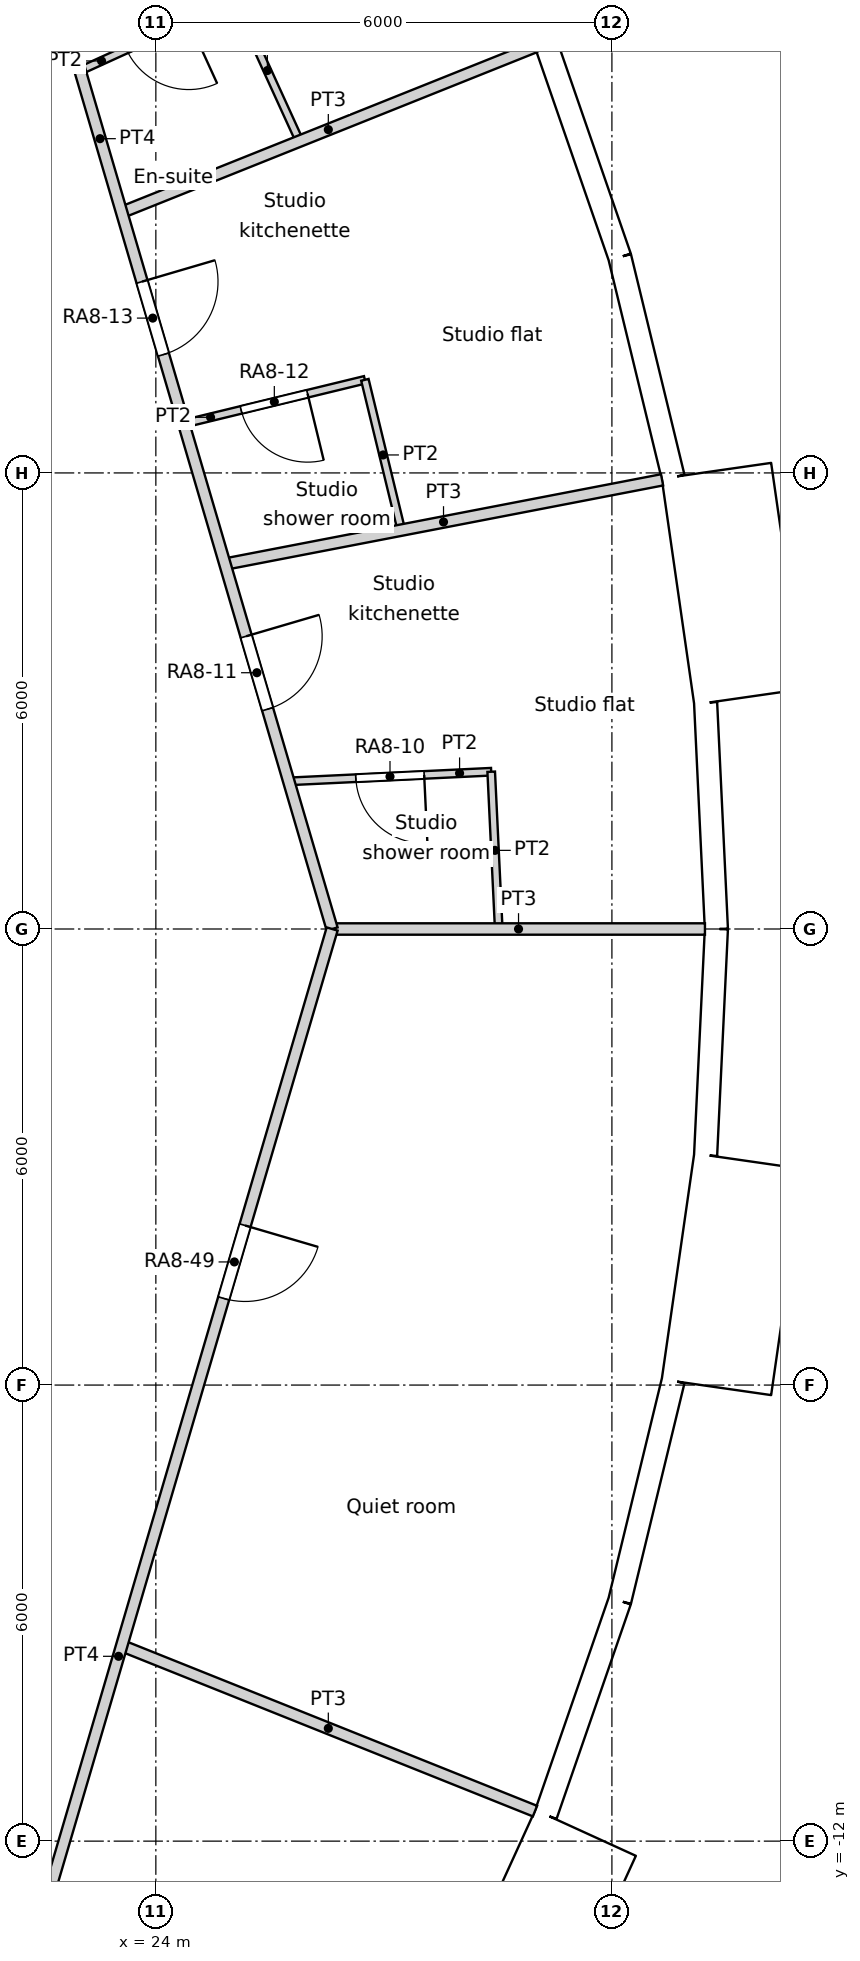
"""IFC4 building model, lengths in metres.
Left out: names, types, materials, properties, quantities, classifications, styles, units other than length and angle.
Written with IfcOpenShell. Run it as: python <this file> out.ifc"""

import sys

from ifc_helpers import new_model, si_unit, direction, frame, frame_2d, origin, origin_2d, place, context, subcontext, project, spatial, rectangle, circle, extrude, element, fill, save


model = new_model("IFC4")
c1 = context("Model", 3, precision=1e-05, world=origin(), true_north=direction((0.0, 1.0)))
c2 = subcontext(c1, "Body", "Model", "MODEL_VIEW")
j1 = project(units=[si_unit("LENGTHUNIT", "METRE"), si_unit("PLANEANGLEUNIT", "RADIAN")], contexts=[c1])
p1 = place(None, origin())
s1 = spatial("IfcSite", under=j1, at=p1, CompositionType="ELEMENT")
p2 = place(p1, origin())
s2 = spatial("IfcBuilding", under=s1, at=p2, CompositionType="ELEMENT")
p3 = place(p2, frame((0.0, 0.0, 103.8)))
s3 = spatial("IfcBuildingStorey", under=s2, at=p3, CompositionType="ELEMENT", Elevation=103.8)
for number, where, z_axis, x_axis in (
    (1, (30.275, 0.0, 0.0), (0.0, 0.0, 1.0), (1.0, 0.0, 0.0)),
    (2, (29.728, 5.729, 0.0), (0.0, 0.0, 1.0), (1.0, 0.0, 0.0)),
    (3, (28.106, 11.252, 0.0), (0.0, 0.0, 1.0), (1.0, 0.0, 0.0)),
    (4, (28.106, -11.252, 0.0), (0.0, 0.0, 1.0), (1.0, 0.0, 0.0)),
    (5, (29.728, -5.729, 0.0), (0.0, 0.0, 1.0), (1.0, 0.0, 0.0)),
):
    element("IfcColumn", number, at=place(p3, frame(where, z_axis=z_axis, x_axis=x_axis)), inside=s3, PredefinedType="COLUMN", context=c2, shape_type="SweptSolid", body=[
        extrude(circle(Radius=0.6, at=origin_2d()), origin(), (0.0, 0.0, 1.0), 3.6),
    ])
for number, where, z_axis, x_axis in (
    (6, (24.548, 0.0, 0.0), (0.0, 0.0, 1.0), (1.0, 0.0, 0.0)),
    (7, (23.886, 5.661, 0.0), (0.0, 0.0, 1.0), (1.0, 0.0, 0.0)),
    (8, (23.886, -5.661, 0.0), (0.0, 0.0, 1.0), (1.0, 0.0, 0.0)),
):
    element("IfcColumn", number, at=place(p3, frame(where, z_axis=z_axis, x_axis=x_axis)), inside=s3, PredefinedType="COLUMN", context=c2, shape_type="SweptSolid", body=[
        extrude(circle(Radius=0.65, at=origin_2d()), origin(), (0.0, 0.0, 1.0), 3.6),
    ])
p4 = place(p3, frame((31.375, 0.0, 0.0), z_axis=(0.0, 0.0, 1.0), x_axis=(-0.047604077644, 0.998866283239, 0.0)))
e9 = element("IfcWall", 9, at=p4, inside=s3, PredefinedType="SOLIDWALL", context=c2, shape_type="SweptSolid", body=[
    extrude(rectangle(XDim=2.98, YDim=0.3, at=frame_2d((1.49, 0.0))), origin(), (0.0, 0.0, 1.0), 3.15),
])
p5 = place(p4, frame((1.49, 0.0, 1.55)))
e10 = element("IfcOpeningElement", 10, at=p5, cuts=e9, PredefinedType="OPENING", context=c2, shape_type="SweptSolid", body=[
    extrude(circle(Radius=0.9, at=origin_2d()), frame((0.0, 0.16, 0.0), z_axis=(0.0, -1.0, 0.0), x_axis=(1.0, 0.0, 0.0)), (0.0, 0.0, 1.0), 0.32),
])
p6 = place(p3, frame((31.802, 3.057, -0.45), z_axis=(0.0, 0.0, 1.0), x_axis=(-0.142332746704, 0.989818866872, 0.0)))
e11 = element("IfcWall", 11, at=p6, inside=s3, PredefinedType="ELEMENTEDWALL", context=c2, shape_type="SweptSolid", body=[
    extrude(rectangle(XDim=3.0, YDim=1.45, at=frame_2d((1.5, 0.0))), origin(), (0.0, 0.0, 1.0), 3.6),
])
p7 = place(p6, frame((1.5, 0.0, 2.0)))
e12 = element("IfcOpeningElement", 12, at=p7, cuts=e11, PredefinedType="OPENING", context=c2, shape_type="SweptSolid", body=[
    extrude(circle(Radius=0.9, at=origin_2d()), frame((0.0, 0.735, 0.0), z_axis=(0.0, -1.0, 0.0), x_axis=(1.0, 0.0, 0.0)), (0.0, 0.0, 1.0), 1.47),
])
p8 = place(p3, frame((30.806, 5.944, 0.0), z_axis=(0.0, 0.0, 1.0), x_axis=(-0.235743081534, 0.971815414319, 0.0)))
e13 = element("IfcWall", 13, at=p8, inside=s3, PredefinedType="SOLIDWALL", context=c2, shape_type="SweptSolid", body=[
    extrude(rectangle(XDim=2.979, YDim=0.3, at=frame_2d((1.49, 0.0))), origin(), (0.0, 0.0, 1.0), 3.15),
])
p9 = place(p8, frame((1.49, 0.0, 1.55)))
e14 = element("IfcOpeningElement", 14, at=p9, cuts=e13, PredefinedType="OPENING", context=c2, shape_type="SweptSolid", body=[
    extrude(circle(Radius=0.9, at=origin_2d()), frame((0.0, 0.16, 0.0), z_axis=(0.0, -1.0, 0.0), x_axis=(1.0, 0.0, 0.0)), (0.0, 0.0, 1.0), 0.32),
])
p10 = place(p3, frame((30.104, 8.839, 0.0), z_axis=(0.0, 0.0, 1.0), x_axis=(-0.327071167136, 0.944999709856, 0.0)))
e15 = element("IfcWall", 15, at=p10, inside=s3, PredefinedType="SOLIDWALL", context=c2, shape_type="SweptSolid", body=[
    extrude(rectangle(XDim=2.98, YDim=0.3, at=frame_2d((1.49, 0.0))), origin(), (0.0, 0.0, 1.0), 3.15),
])
p11 = place(p10, frame((1.49, 0.0, 1.55)))
e16 = element("IfcOpeningElement", 16, at=p11, cuts=e15, PredefinedType="OPENING", context=c2, shape_type="SweptSolid", body=[
    extrude(circle(Radius=0.9, at=origin_2d()), frame((0.0, 0.16, 0.0), z_axis=(0.0, -1.0, 0.0), x_axis=(1.0, 0.0, 0.0)), (0.0, 0.0, 1.0), 0.32),
])
p12 = place(p3, frame((28.407, -14.622, -0.45), z_axis=(0.0, 0.0, 1.0), x_axis=(0.415427028395, 0.909626508012, 0.0)))
e17 = element("IfcWall", 17, at=p12, inside=s3, PredefinedType="ELEMENTEDWALL", context=c2, shape_type="SweptSolid", body=[
    extrude(rectangle(XDim=3.0, YDim=1.45, at=frame_2d((1.5, 0.0))), origin(), (0.0, 0.0, 1.0), 3.6),
])
p13 = place(p12, frame((1.5, 0.0, 2.0)))
e18 = element("IfcOpeningElement", 18, at=p13, cuts=e17, PredefinedType="OPENING", context=c2, shape_type="SweptSolid", body=[
    extrude(circle(Radius=0.9, at=origin_2d()), frame((0.0, 0.735, 0.0), z_axis=(0.0, -1.0, 0.0), x_axis=(1.0, 0.0, 0.0)), (0.0, 0.0, 1.0), 1.47),
])
p14 = place(p3, frame((29.129, -11.655, 0.0), z_axis=(0.0, 0.0, 1.0), x_axis=(0.327071167136, 0.944999709856, 0.0)))
e19 = element("IfcWall", 19, at=p14, inside=s3, PredefinedType="SOLIDWALL", context=c2, shape_type="SweptSolid", body=[
    extrude(rectangle(XDim=2.98, YDim=0.3, at=frame_2d((1.49, 0.0))), origin(), (0.0, 0.0, 1.0), 3.15),
])
p15 = place(p14, frame((1.49, 0.0, 1.55)))
e20 = element("IfcOpeningElement", 20, at=p15, cuts=e19, PredefinedType="OPENING", context=c2, shape_type="SweptSolid", body=[
    extrude(circle(Radius=0.9, at=origin_2d()), frame((0.0, 0.16, 0.0), z_axis=(0.0, -1.0, 0.0), x_axis=(1.0, 0.0, 0.0)), (0.0, 0.0, 1.0), 0.32),
])
p16 = place(p3, frame((30.104, -8.839, 0.0), z_axis=(0.0, 0.0, 1.0), x_axis=(0.235743081534, 0.971815414319, 0.0)))
e21 = element("IfcWall", 21, at=p16, inside=s3, PredefinedType="SOLIDWALL", context=c2, shape_type="SweptSolid", body=[
    extrude(rectangle(XDim=2.979, YDim=0.3, at=frame_2d((1.49, 0.0))), origin(), (0.0, 0.0, 1.0), 3.15),
])
p17 = place(p16, frame((1.49, 0.0, 1.55)))
e22 = element("IfcOpeningElement", 22, at=p17, cuts=e21, PredefinedType="OPENING", context=c2, shape_type="SweptSolid", body=[
    extrude(circle(Radius=0.9, at=origin_2d()), frame((0.0, 0.16, 0.0), z_axis=(0.0, -1.0, 0.0), x_axis=(1.0, 0.0, 0.0)), (0.0, 0.0, 1.0), 0.32),
])
p18 = place(p3, frame((31.375, -6.027, -0.45), z_axis=(0.0, 0.0, 1.0), x_axis=(0.142332746704, 0.989818866872, 0.0)))
e23 = element("IfcWall", 23, at=p18, inside=s3, PredefinedType="ELEMENTEDWALL", context=c2, shape_type="SweptSolid", body=[
    extrude(rectangle(XDim=3.0, YDim=1.45, at=frame_2d((1.5, 0.0))), origin(), (0.0, 0.0, 1.0), 3.6),
])
p19 = place(p18, frame((1.5, 0.0, 2.0)))
e24 = element("IfcOpeningElement", 24, at=p19, cuts=e23, PredefinedType="OPENING", context=c2, shape_type="SweptSolid", body=[
    extrude(circle(Radius=0.9, at=origin_2d()), frame((0.0, 0.735, 0.0), z_axis=(0.0, -1.0, 0.0), x_axis=(1.0, 0.0, 0.0)), (0.0, 0.0, 1.0), 1.47),
])
p20 = place(p3, frame((31.233, -2.976, 0.0), z_axis=(0.0, 0.0, 1.0), x_axis=(0.047604077644, 0.998866283239, 0.0)))
e25 = element("IfcWall", 25, at=p20, inside=s3, PredefinedType="SOLIDWALL", context=c2, shape_type="SweptSolid", body=[
    extrude(rectangle(XDim=2.98, YDim=0.3, at=frame_2d((1.49, 0.0))), origin(), (0.0, 0.0, 1.0), 3.15),
])
p21 = place(p20, frame((1.49, 0.0, 1.55)))
e26 = element("IfcOpeningElement", 26, at=p21, cuts=e25, PredefinedType="OPENING", context=c2, shape_type="SweptSolid", body=[
    extrude(circle(Radius=0.9, at=origin_2d()), frame((0.0, 0.16, 0.0), z_axis=(0.0, -1.0, 0.0), x_axis=(1.0, 0.0, 0.0)), (0.0, 0.0, 1.0), 0.32),
])
p22 = place(p3, frame((22.14, 14.229, 0.0), z_axis=(0.0, 0.0, 1.0), x_axis=(0.281780364869, -0.959478934617, 0.0)))
e27 = element("IfcWall", 27, at=p22, inside=s3, PredefinedType="PARTITIONING", context=c2, shape_type="SweptSolid", body=[
    extrude(rectangle(XDim=14.83, YDim=0.15, at=frame_2d((7.415, 0.0))), origin(), (0.0, 0.0, 1.0), 3.15),
])
p23 = place(p22, frame((10.816, 0.0, 0.0)))
e28 = element("IfcOpeningElement", 28, at=p23, cuts=e27, PredefinedType="OPENING", context=c2, shape_type="SweptSolid", body=[
    extrude(rectangle(XDim=1.0, YDim=2.1, at=frame_2d((0.5, 1.05))), frame((0.0, 0.075, 0.0), z_axis=(0.0, -1.0, 0.0), x_axis=(1.0, 0.0, 0.0)), (0.0, 0.0, 1.0), 0.15),
])
p24 = place(p22, frame((5.953, 0.0, 0.0)))
e29 = element("IfcOpeningElement", 29, at=p24, cuts=e27, PredefinedType="OPENING", context=c2, shape_type="SweptSolid", body=[
    extrude(rectangle(XDim=1.0, YDim=2.1, at=frame_2d((0.5, 1.05))), frame((0.0, 0.075, 0.0), z_axis=(0.0, -1.0, 0.0), x_axis=(1.0, 0.0, 0.0)), (0.0, 0.0, 1.0), 0.15),
])
p25 = place(p22, frame((1.033, 0.0, 0.0)))
e30 = element("IfcOpeningElement", 30, at=p25, cuts=e27, PredefinedType="OPENING", context=c2, shape_type="SweptSolid", body=[
    extrude(rectangle(XDim=1.0, YDim=2.1, at=frame_2d((0.5, 1.05))), frame((0.0, 0.075, 0.0), z_axis=(0.0, -1.0, 0.0), x_axis=(1.0, 0.0, 0.0)), (0.0, 0.0, 1.0), 0.15),
])
p26 = place(p3, frame((22.141, -14.229, 0.0), z_axis=(0.0, 0.0, 1.0), x_axis=(0.281745602308, 0.959489143024, 0.0)))
e31 = element("IfcWall", 31, at=p26, inside=s3, PredefinedType="PARTITIONING", context=c2, shape_type="SweptSolid", body=[
    extrude(rectangle(XDim=14.83, YDim=0.15, at=frame_2d((7.415, 0.0))), origin(), (0.0, 0.0, 1.0), 3.15),
])
p27 = place(p26, frame((9.765, 0.0, 0.0)))
e32 = element("IfcOpeningElement", 32, at=p27, cuts=e31, PredefinedType="OPENING", context=c2, shape_type="SweptSolid", body=[
    extrude(rectangle(XDim=1.0, YDim=2.04, at=frame_2d((0.5, 1.02))), frame((0.0, 0.075, 0.0), z_axis=(0.0, -1.0, 0.0), x_axis=(1.0, 0.0, 0.0)), (0.0, 0.0, 1.0), 0.15),
])
p28 = place(p3, frame((28.412, 2.069, 0.0), z_axis=(0.0, 0.0, 1.0), x_axis=(0.047733138673, -0.998860124078, 0.0)))
e33 = element("IfcWall", 33, at=p28, inside=s3, PredefinedType="PARTITIONING", context=c2, shape_type="SweptSolid", body=[
    extrude(rectangle(XDim=2.072, YDim=0.1, at=frame_2d((1.036, 0.0))), origin(), (0.0, 0.0, 1.0), 3.15),
])
p29 = place(p3, frame((25.749, 1.942, 0.0), z_axis=(0.0, 0.0, 1.0), x_axis=(0.998861290624, 0.047708721344, 0.0)))
e34 = element("IfcWall", 34, at=p29, inside=s3, PredefinedType="PARTITIONING", context=c2, shape_type="SweptSolid", body=[
    extrude(rectangle(XDim=2.666, YDim=0.1, at=frame_2d((1.333, 0.0))), origin(), (0.0, 0.0, 1.0), 3.15),
])
p30 = place(p29, frame((0.883, 0.0, 0.0)))
e35 = element("IfcOpeningElement", 35, at=p30, cuts=e34, PredefinedType="OPENING", context=c2, shape_type="SweptSolid", body=[
    extrude(rectangle(XDim=0.9, YDim=2.04, at=frame_2d((0.45, 1.02))), frame((0.0, 0.05, 0.0), z_axis=(0.0, -1.0, 0.0), x_axis=(1.0, 0.0, 0.0)), (0.0, 0.0, 1.0), 0.1),
])
p31 = place(p3, frame((24.909, 4.8, 0.0), z_axis=(0.0, 0.0, 1.0), x_axis=(0.981912070464, 0.189337492, 0.0)))
e36 = element("IfcWall", 36, at=p31, inside=s3, PredefinedType="PARTITIONING", context=c2, shape_type="SweptSolid", body=[
    extrude(rectangle(XDim=5.857, YDim=0.15, at=frame_2d((2.928, 0.0))), origin(), (0.0, 0.0, 1.0), 3.15),
])
p32 = place(p3, frame((26.319, 0.0, 0.0), z_axis=(0.0, 0.0, 1.0), x_axis=(1.0, 0.0, 0.0)))
e37 = element("IfcWall", 37, at=p32, inside=s3, PredefinedType="PARTITIONING", context=c2, shape_type="SweptSolid", body=[
    extrude(rectangle(XDim=4.905, YDim=0.15, at=frame_2d((2.453, 0.0))), origin(), (0.0, 0.0, 1.0), 3.15),
])
p33 = place(p3, frame((26.75, 7.225, 0.0), z_axis=(0.0, 0.0, 1.0), x_axis=(0.23592286129, -0.97177178572, 0.0)))
e38 = element("IfcWall", 38, at=p33, inside=s3, PredefinedType="PARTITIONING", context=c2, shape_type="SweptSolid", body=[
    extrude(rectangle(XDim=2.034, YDim=0.1, at=frame_2d((1.017, 0.0))), origin(), (0.0, 0.0, 1.0), 3.15),
])
p34 = place(p3, frame((24.367, 6.646, 0.0), z_axis=(0.0, 0.0, 1.0), x_axis=(0.971720101056, 0.236135650006, 0.0)))
e39 = element("IfcWall", 39, at=p34, inside=s3, PredefinedType="PARTITIONING", context=c2, shape_type="SweptSolid", body=[
    extrude(rectangle(XDim=2.452, YDim=0.1, at=frame_2d((1.226, 0.0))), origin(), (0.0, 0.0, 1.0), 3.15),
])
p35 = place(p34, frame((0.776, 0.0, 0.0)))
e40 = element("IfcOpeningElement", 40, at=p35, cuts=e39, PredefinedType="OPENING", context=c2, shape_type="SweptSolid", body=[
    extrude(rectangle(XDim=0.9, YDim=2.04, at=frame_2d((0.45, 1.02))), frame((0.0, 0.05, 0.0), z_axis=(0.0, -1.0, 0.0), x_axis=(1.0, 0.0, 0.0)), (0.0, 0.0, 1.0), 0.1),
])
p36 = place(p3, frame((23.55, 9.428, 0.0), z_axis=(0.0, 0.0, 1.0), x_axis=(0.9283702981, 0.371656547911, 0.0)))
e41 = element("IfcWall", 41, at=p36, inside=s3, PredefinedType="PARTITIONING", context=c2, shape_type="SweptSolid", body=[
    extrude(rectangle(XDim=5.858, YDim=0.15, at=frame_2d((2.929, 0.0))), origin(), (0.0, 0.0, 1.0), 3.15),
])
p37 = place(p3, frame((25.043, 12.222, 0.0), z_axis=(0.0, 0.0, 1.0), x_axis=(0.41546015385, -0.909611378866, 0.0)))
e42 = element("IfcWall", 42, at=p37, inside=s3, PredefinedType="PARTITIONING", context=c2, shape_type="SweptSolid", body=[
    extrude(rectangle(XDim=2.042, YDim=0.1, at=frame_2d((1.021, 0.0))), origin(), (0.0, 0.0, 1.0), 3.15),
])
p38 = place(p3, frame((23.003, 11.291, 0.0), z_axis=(0.0, 0.0, 1.0), x_axis=(0.90975773562, 0.41513956988, 0.0)))
e43 = element("IfcWall", 43, at=p38, inside=s3, PredefinedType="PARTITIONING", context=c2, shape_type="SweptSolid", body=[
    extrude(rectangle(XDim=2.242, YDim=0.1, at=frame_2d((1.121, 0.0))), origin(), (0.0, 0.0, 1.0), 3.15),
])
p39 = place(p38, frame((0.671, 0.0, 0.0)))
e44 = element("IfcOpeningElement", 44, at=p39, cuts=e43, PredefinedType="OPENING", context=c2, shape_type="SweptSolid", body=[
    extrude(rectangle(XDim=0.9, YDim=2.04, at=frame_2d((0.45, 1.02))), frame((0.0, 0.05, 0.0), z_axis=(0.0, -1.0, 0.0), x_axis=(1.0, 0.0, 0.0)), (0.0, 0.0, 1.0), 0.1),
])
p40 = place(p3, frame((23.55, -9.428, 0.0), z_axis=(0.0, 0.0, 1.0), x_axis=(0.9283702981, -0.371656547911, 0.0)))
e45 = element("IfcWall", 45, at=p40, inside=s3, PredefinedType="PARTITIONING", context=c2, shape_type="SweptSolid", body=[
    extrude(rectangle(XDim=5.858, YDim=0.15, at=frame_2d((2.929, 0.0))), origin(), (0.0, 0.0, 1.0), 3.15),
])
p41 = place(p5, origin())
e46 = element("IfcWindow", 46, at=p41, inside=s3, PartitioningType="SINGLE_PANEL", PredefinedType="WINDOW", context=c2, shape_type="SweptSolid", body=[
    extrude(circle(Radius=0.9, at=origin_2d()), frame((0.0, 0.12, 0.0), z_axis=(0.0, -1.0, 0.0), x_axis=(1.0, 0.0, 0.0)), (0.0, 0.0, 1.0), 0.1),
])
fill(e10, e46)
p42 = place(p7, origin())
e47 = element("IfcWindow", 47, at=p42, inside=s3, PartitioningType="SINGLE_PANEL", PredefinedType="WINDOW", context=c2, shape_type="SweptSolid", body=[
    extrude(circle(Radius=0.9, at=origin_2d()), frame((0.0, 0.695, 0.0), z_axis=(0.0, -1.0, 0.0), x_axis=(1.0, 0.0, 0.0)), (0.0, 0.0, 1.0), 0.1),
])
fill(e12, e47)
p43 = place(p9, origin())
e48 = element("IfcWindow", 48, at=p43, inside=s3, PartitioningType="SINGLE_PANEL", PredefinedType="WINDOW", context=c2, shape_type="SweptSolid", body=[
    extrude(circle(Radius=0.9, at=origin_2d()), frame((0.0, 0.12, 0.0), z_axis=(0.0, -1.0, 0.0), x_axis=(1.0, 0.0, 0.0)), (0.0, 0.0, 1.0), 0.1),
])
fill(e14, e48)
p44 = place(p11, origin())
e49 = element("IfcWindow", 49, at=p44, inside=s3, PartitioningType="SINGLE_PANEL", PredefinedType="WINDOW", context=c2, shape_type="SweptSolid", body=[
    extrude(circle(Radius=0.9, at=origin_2d()), frame((0.0, 0.12, 0.0), z_axis=(0.0, -1.0, 0.0), x_axis=(1.0, 0.0, 0.0)), (0.0, 0.0, 1.0), 0.1),
])
fill(e16, e49)
p45 = place(p13, origin())
e50 = element("IfcWindow", 50, at=p45, inside=s3, PartitioningType="SINGLE_PANEL", PredefinedType="WINDOW", context=c2, shape_type="SweptSolid", body=[
    extrude(circle(Radius=0.9, at=origin_2d()), frame((0.0, 0.695, 0.0), z_axis=(0.0, -1.0, 0.0), x_axis=(1.0, 0.0, 0.0)), (0.0, 0.0, 1.0), 0.1),
])
fill(e18, e50)
p46 = place(p15, origin())
e51 = element("IfcWindow", 51, at=p46, inside=s3, PartitioningType="SINGLE_PANEL", PredefinedType="WINDOW", context=c2, shape_type="SweptSolid", body=[
    extrude(circle(Radius=0.9, at=origin_2d()), frame((0.0, 0.12, 0.0), z_axis=(0.0, -1.0, 0.0), x_axis=(1.0, 0.0, 0.0)), (0.0, 0.0, 1.0), 0.1),
])
fill(e20, e51)
p47 = place(p17, origin())
e52 = element("IfcWindow", 52, at=p47, inside=s3, PartitioningType="SINGLE_PANEL", PredefinedType="WINDOW", context=c2, shape_type="SweptSolid", body=[
    extrude(circle(Radius=0.9, at=origin_2d()), frame((0.0, 0.12, 0.0), z_axis=(0.0, -1.0, 0.0), x_axis=(1.0, 0.0, 0.0)), (0.0, 0.0, 1.0), 0.1),
])
fill(e22, e52)
p48 = place(p19, origin())
e53 = element("IfcWindow", 53, at=p48, inside=s3, PartitioningType="SINGLE_PANEL", PredefinedType="WINDOW", context=c2, shape_type="SweptSolid", body=[
    extrude(circle(Radius=0.9, at=origin_2d()), frame((0.0, 0.695, 0.0), z_axis=(0.0, -1.0, 0.0), x_axis=(1.0, 0.0, 0.0)), (0.0, 0.0, 1.0), 0.1),
])
fill(e24, e53)
p49 = place(p21, origin())
e54 = element("IfcWindow", 54, at=p49, inside=s3, PartitioningType="SINGLE_PANEL", PredefinedType="WINDOW", context=c2, shape_type="SweptSolid", body=[
    extrude(circle(Radius=0.9, at=origin_2d()), frame((0.0, 0.12, 0.0), z_axis=(0.0, -1.0, 0.0), x_axis=(1.0, 0.0, 0.0)), (0.0, 0.0, 1.0), 0.1),
])
fill(e26, e54)
p50 = place(p30, origin())
e55 = element("IfcDoor", 55, at=p50, inside=s3, OperationType="SINGLE_SWING_LEFT", PredefinedType="DOOR", context=c2, shape_type="SweptSolid", body=[
    extrude(rectangle(XDim=0.9, YDim=2.04, at=frame_2d((0.45, 1.02))), frame((0.0, 0.025, 0.0), z_axis=(0.0, -1.0, 0.0), x_axis=(1.0, 0.0, 0.0)), (0.0, 0.0, 1.0), 0.05),
])
fill(e35, e55)
p51 = place(p23, origin())
e56 = element("IfcDoor", 56, at=p51, inside=s3, OperationType="SINGLE_SWING_LEFT", PredefinedType="DOOR", context=c2, shape_type="SweptSolid", body=[
    extrude(rectangle(XDim=1.0, YDim=2.1, at=frame_2d((0.5, 1.05))), frame((0.0, 0.025, 0.0), z_axis=(0.0, -1.0, 0.0), x_axis=(1.0, 0.0, 0.0)), (0.0, 0.0, 1.0), 0.05),
])
fill(e28, e56)
p52 = place(p35, origin())
e57 = element("IfcDoor", 57, at=p52, inside=s3, OperationType="SINGLE_SWING_LEFT", PredefinedType="DOOR", context=c2, shape_type="SweptSolid", body=[
    extrude(rectangle(XDim=0.9, YDim=2.04, at=frame_2d((0.45, 1.02))), frame((0.0, 0.025, 0.0), z_axis=(0.0, -1.0, 0.0), x_axis=(1.0, 0.0, 0.0)), (0.0, 0.0, 1.0), 0.05),
])
fill(e40, e57)
p53 = place(p24, origin())
e58 = element("IfcDoor", 58, at=p53, inside=s3, OperationType="SINGLE_SWING_LEFT", PredefinedType="DOOR", context=c2, shape_type="SweptSolid", body=[
    extrude(rectangle(XDim=1.0, YDim=2.1, at=frame_2d((0.5, 1.05))), frame((0.0, 0.025, 0.0), z_axis=(0.0, -1.0, 0.0), x_axis=(1.0, 0.0, 0.0)), (0.0, 0.0, 1.0), 0.05),
])
fill(e29, e58)
p54 = place(p27, origin())
e59 = element("IfcDoor", 59, at=p54, inside=s3, OperationType="SINGLE_SWING_LEFT", PredefinedType="DOOR", context=c2, shape_type="SweptSolid", body=[
    extrude(rectangle(XDim=1.0, YDim=2.04, at=frame_2d((0.5, 1.02))), frame((0.0, 0.025, 0.0), z_axis=(0.0, -1.0, 0.0), x_axis=(1.0, 0.0, 0.0)), (0.0, 0.0, 1.0), 0.05),
])
fill(e32, e59)
save(model, sys.argv[1])
